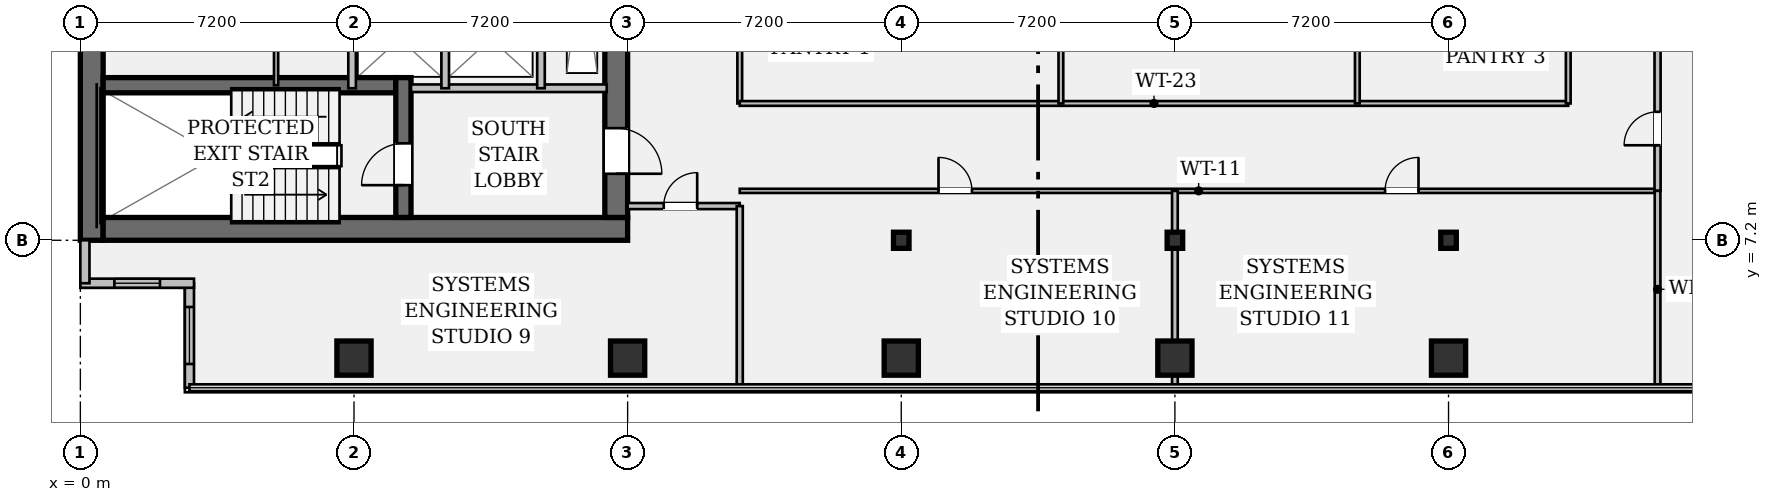
"""IFC4 building model, lengths in metres.
Left out: names, types, materials, properties, quantities, classifications, styles, units other than length and angle.
Written with IfcOpenShell. Run it as: python <this file> out.ifc"""

import sys

from ifc_helpers import new_model, si_unit, direction, frame, frame_2d, origin, origin_2d, place, context, subcontext, project, spatial, rectangle, hollow_rectangle, i_section, extrude, element, fill, save


model = new_model("IFC4")
c1 = context("Model", 3, precision=1e-05, world=origin(), true_north=direction((0.0, 1.0)))
c2 = subcontext(c1, "Body", "Model", "MODEL_VIEW")
j1 = project(units=[si_unit("LENGTHUNIT", "METRE"), si_unit("PLANEANGLEUNIT", "RADIAN")], contexts=[c1])
p1 = place(None, origin())
s1 = spatial("IfcSite", under=j1, at=p1, CompositionType="ELEMENT")
p2 = place(p1, origin())
s2 = spatial("IfcBuilding", under=s1, at=p2, CompositionType="ELEMENT")
p3 = place(p2, frame((0.0, 0.0, 121.45)))
s3 = spatial("IfcBuildingStorey", under=s2, at=p3, CompositionType="ELEMENT", Elevation=121.45)
p4 = place(p3, frame((0.3, 7.2, 0.0), z_axis=(0.0, 0.0, 1.0), x_axis=(0.0, 1.0, 0.0)))
e1 = element("IfcWall", 1, at=p4, inside=s3, PredefinedType="SHEAR", context=c2, shape_type="SweptSolid", body=[
    extrude(rectangle(XDim=28.8, YDim=0.6, at=frame_2d((14.4, 0.0))), origin(), (0.0, 0.0, 1.0), 3.58),
])
p5 = place(p3, frame((0.6, 7.5, 0.0), z_axis=(0.0, 0.0, 1.0), x_axis=(1.0, 0.0, 0.0)))
e2 = element("IfcWall", 2, at=p5, inside=s3, PredefinedType="SHEAR", context=c2, shape_type="SweptSolid", body=[
    extrude(rectangle(XDim=13.8, YDim=0.6, at=frame_2d((6.9, 0.0))), origin(), (0.0, 0.0, 1.0), 3.58),
])
p6 = place(p3, frame((14.1, 35.4, 0.0), z_axis=(0.0, 0.0, 1.0), x_axis=(0.0, -1.0, 0.0)))
e3 = element("IfcWall", 3, at=p6, inside=s3, PredefinedType="SHEAR", context=c2, shape_type="SweptSolid", body=[
    extrude(rectangle(XDim=27.6, YDim=0.6, at=frame_2d((13.8, 0.0))), origin(), (0.0, 0.0, 1.0), 3.58),
])
p7 = place(p6, frame((1.3, 0.0, 0.0)))
e4 = element("IfcOpeningElement", 4, at=p7, cuts=e3, PredefinedType="OPENING", context=c2, shape_type="SweptSolid", body=[
    extrude(rectangle(XDim=1.2, YDim=2.15, at=frame_2d((0.6, 1.075))), frame((0.0, 0.312, 0.0), z_axis=(0.0, -1.0, 0.0), x_axis=(1.0, 0.0, 0.0)), (0.0, 0.0, 1.0), 0.624),
])
p8 = place(p6, frame((25.25, 0.0, 0.0)))
e5 = element("IfcOpeningElement", 5, at=p8, cuts=e3, PredefinedType="OPENING", context=c2, shape_type="SweptSolid", body=[
    extrude(rectangle(XDim=1.2, YDim=2.15, at=frame_2d((0.6, 1.075))), frame((0.0, 0.312, 0.0), z_axis=(0.0, -1.0, 0.0), x_axis=(1.0, 0.0, 0.0)), (0.0, 0.0, 1.0), 0.624),
])
p9 = place(p6, frame((14.6, 0.0, 0.0)))
e6 = element("IfcOpeningElement", 6, at=p9, cuts=e3, PredefinedType="OPENING", context=c2, shape_type="SweptSolid", body=[
    extrude(rectangle(XDim=1.6, YDim=2.2, at=frame_2d((0.8, 1.1))), frame((0.0, 0.312, 0.0), z_axis=(0.0, -1.0, 0.0), x_axis=(1.0, 0.0, 0.0)), (0.0, 0.0, 1.0), 0.624),
])
p10 = place(p3, frame((0.6, 11.28, 0.0), z_axis=(0.0, 0.0, 1.0), x_axis=(1.0, 0.0, 0.0)))
e7 = element("IfcWall", 7, at=p10, inside=s3, PredefinedType="SHEAR", context=c2, shape_type="SweptSolid", body=[
    extrude(rectangle(XDim=7.7, YDim=0.4, at=frame_2d((3.85, 0.0))), origin(), (0.0, 0.0, 1.0), 3.58),
])
p11 = place(p3, frame((8.5, 7.8, 0.0), z_axis=(0.0, 0.0, 1.0), x_axis=(0.0, 1.0, 0.0)))
e8 = element("IfcWall", 8, at=p11, inside=s3, PredefinedType="SHEAR", context=c2, shape_type="SweptSolid", body=[
    extrude(rectangle(XDim=3.68, YDim=0.4, at=frame_2d((1.84, 0.0))), origin(), (0.0, 0.0, 1.0), 3.58),
])
p12 = place(p11, frame((0.85, 0.0, 0.0)))
e9 = element("IfcOpeningElement", 9, at=p12, cuts=e8, PredefinedType="OPENING", context=c2, shape_type="SweptSolid", body=[
    extrude(rectangle(XDim=1.1, YDim=2.15, at=frame_2d((0.55, 1.075))), frame((0.0, 0.212, 0.0), z_axis=(0.0, -1.0, 0.0), x_axis=(1.0, 0.0, 0.0)), (0.0, 0.0, 1.0), 0.424),
])
for number, where, z_axis, x_axis in (
    (10, (7.2, 4.1, 0.0), (0.0, 0.0, 1.0), (1.0, 0.0, 0.0)),
    (11, (14.4, 4.1, 0.0), (0.0, 0.0, 1.0), (1.0, 0.0, 0.0)),
    (12, (21.6, 4.1, 0.0), (0.0, 0.0, 1.0), (1.0, 0.0, 0.0)),
):
    element("IfcColumn", number, at=place(p3, frame(where, z_axis=z_axis, x_axis=x_axis)), inside=s3, PredefinedType="COLUMN", context=c2, shape_type="SweptSolid", body=[
        extrude(hollow_rectangle(XDim=0.9, YDim=0.9, WallThickness=0.055, at=origin_2d()), origin(), (0.0, 0.0, 1.0), 3.58),
    ])
p13 = place(p3, frame((21.6, 7.2, 0.0), z_axis=(0.0, 0.0, 1.0), x_axis=(1.0, 0.0, 0.0)))
e13 = element("IfcColumn", 13, at=p13, inside=s3, PredefinedType="COLUMN", context=c2, shape_type="SweptSolid", body=[
    extrude(i_section(OverallWidth=0.409, OverallDepth=0.424, WebThickness=0.033, FlangeThickness=0.052, FilletRadius=0.018, at=origin_2d()), origin(), (0.0, 0.0, 1.0), 3.58),
])
p14 = place(p3, frame((28.8, 4.1, 0.0), z_axis=(0.0, 0.0, 1.0), x_axis=(1.0, 0.0, 0.0)))
e14 = element("IfcColumn", 14, at=p14, inside=s3, PredefinedType="COLUMN", context=c2, shape_type="SweptSolid", body=[
    extrude(hollow_rectangle(XDim=0.9, YDim=0.9, WallThickness=0.055, at=origin_2d()), origin(), (0.0, 0.0, 1.0), 3.58),
])
p15 = place(p3, frame((28.8, 7.2, 0.0), z_axis=(0.0, 0.0, 1.0), x_axis=(1.0, 0.0, 0.0)))
e15 = element("IfcColumn", 15, at=p15, inside=s3, PredefinedType="COLUMN", context=c2, shape_type="SweptSolid", body=[
    extrude(i_section(OverallWidth=0.409, OverallDepth=0.424, WebThickness=0.033, FlangeThickness=0.052, FilletRadius=0.018, at=origin_2d()), origin(), (0.0, 0.0, 1.0), 3.58),
])
p16 = place(p3, frame((36.0, 4.1, 0.0), z_axis=(0.0, 0.0, 1.0), x_axis=(1.0, 0.0, 0.0)))
e16 = element("IfcColumn", 16, at=p16, inside=s3, PredefinedType="COLUMN", context=c2, shape_type="SweptSolid", body=[
    extrude(hollow_rectangle(XDim=0.9, YDim=0.9, WallThickness=0.055, at=origin_2d()), origin(), (0.0, 0.0, 1.0), 3.58),
])
p17 = place(p3, frame((36.0, 7.2, 0.0), z_axis=(0.0, 0.0, 1.0), x_axis=(1.0, 0.0, 0.0)))
e17 = element("IfcColumn", 17, at=p17, inside=s3, PredefinedType="COLUMN", context=c2, shape_type="SweptSolid", body=[
    extrude(i_section(OverallWidth=0.409, OverallDepth=0.424, WebThickness=0.033, FlangeThickness=0.052, FilletRadius=0.018, at=origin_2d()), origin(), (0.0, 0.0, 1.0), 3.58),
])
p18 = place(p3, frame((2.87, 3.32, 0.0), z_axis=(0.0, 0.0, 1.0), x_axis=(0.0, 1.0, 0.0)))
e18 = element("IfcWall", 18, at=p18, inside=s3, PredefinedType="STANDARD", context=c2, shape_type="SweptSolid", body=[
    extrude(rectangle(XDim=2.75, YDim=0.24, at=frame_2d((1.375, 0.0))), origin(), (0.0, 0.0, 1.0), 3.58),
])
p19 = place(p18, frame((0.625, 0.0, 0.95)))
e19 = element("IfcOpeningElement", 19, at=p19, cuts=e18, PredefinedType="OPENING", context=c2, shape_type="SweptSolid", body=[
    extrude(rectangle(XDim=1.5, YDim=1.8, at=frame_2d((0.75, 0.9))), frame((0.0, 0.132, 0.0), z_axis=(0.0, -1.0, 0.0), x_axis=(1.0, 0.0, 0.0)), (0.0, 0.0, 1.0), 0.264),
])
p20 = place(p3, frame((2.99, 6.07, 0.0), z_axis=(0.0, 0.0, 1.0), x_axis=(-1.0, 0.0, 0.0)))
e20 = element("IfcWall", 20, at=p20, inside=s3, PredefinedType="STANDARD", context=c2, shape_type="SweptSolid", body=[
    extrude(rectangle(XDim=2.99, YDim=0.24, at=frame_2d((1.495, 0.0))), origin(), (0.0, 0.0, 1.0), 3.58),
])
p21 = place(p20, frame((0.895, 0.0, 0.95)))
e21 = element("IfcOpeningElement", 21, at=p21, cuts=e20, PredefinedType="OPENING", context=c2, shape_type="SweptSolid", body=[
    extrude(rectangle(XDim=1.2, YDim=1.8, at=frame_2d((0.6, 0.9))), frame((0.0, 0.132, 0.0), z_axis=(0.0, -1.0, 0.0), x_axis=(1.0, 0.0, 0.0)), (0.0, 0.0, 1.0), 0.264),
])
p22 = place(p3, frame((0.12, 6.07, 0.0), z_axis=(0.0, 0.0, 1.0), x_axis=(0.0, 1.0, 0.0)))
e22 = element("IfcWall", 22, at=p22, inside=s3, PredefinedType="STANDARD", context=c2, shape_type="SweptSolid", body=[
    extrude(rectangle(XDim=1.13, YDim=0.24, at=frame_2d((0.565, 0.0))), origin(), (0.0, 0.0, 1.0), 3.58),
])
p23 = place(p3, frame((8.7, 11.2, 0.0), z_axis=(0.0, 0.0, 1.0), x_axis=(1.0, 0.0, 0.0)))
e23 = element("IfcWall", 23, at=p23, inside=s3, PredefinedType="PARTITIONING", context=c2, shape_type="SweptSolid", body=[
    extrude(rectangle(XDim=5.15, YDim=0.2, at=frame_2d((2.575, 0.0))), origin(), (0.0, 0.0, 1.0), 3.58),
])
for number, where, z_axis, x_axis in (
    (24, (7.15, 11.2, 0.0), (0.0, 0.0, 1.0), (0.0, 1.0, 0.0)),
    (25, (9.6, 11.2, 0.0), (0.0, 0.0, 1.0), (0.0, 1.0, 0.0)),
):
    element("IfcWall", number, at=place(p3, frame(where, z_axis=z_axis, x_axis=x_axis)), inside=s3, PredefinedType="PARTITIONING", context=c2, shape_type="SweptSolid", body=[
        extrude(rectangle(XDim=2.4, YDim=0.2, at=frame_2d((1.2, 0.0))), origin(), (0.0, 0.0, 1.0), 3.58),
    ])
p24 = place(p3, frame((12.12, 11.2, 0.0), z_axis=(0.0, 0.0, 1.0), x_axis=(0.0, 1.0, 0.0)))
e26 = element("IfcWall", 26, at=p24, inside=s3, PredefinedType="PARTITIONING", context=c2, shape_type="SweptSolid", body=[
    extrude(rectangle(XDim=6.6, YDim=0.2, at=frame_2d((3.3, 0.0))), origin(), (0.0, 0.0, 1.0), 3.58),
])
p25 = place(p24, frame((2.95, 0.0, 0.0)))
e27 = element("IfcOpeningElement", 27, at=p25, cuts=e26, PredefinedType="OPENING", context=c2, shape_type="SweptSolid", body=[
    extrude(rectangle(XDim=0.85, YDim=2.15, at=frame_2d((0.425, 1.075))), frame((0.0, 0.112, 0.0), z_axis=(0.0, -1.0, 0.0), x_axis=(1.0, 0.0, 0.0)), (0.0, 0.0, 1.0), 0.224),
])
p26 = place(p3, frame((5.15, 11.28, 0.0), z_axis=(0.0, 0.0, 1.0), x_axis=(0.0, 1.0, 0.0)))
e28 = element("IfcWall", 28, at=p26, inside=s3, PredefinedType="PARTITIONING", context=c2, shape_type="SweptSolid", body=[
    extrude(rectangle(XDim=4.42, YDim=0.11, at=frame_2d((2.21, 0.0))), origin(), (0.0, 0.0, 1.0), 3.58),
])
p27 = place(p3, frame((14.4, 8.1, 0.0), z_axis=(0.0, 0.0, 1.0), x_axis=(1.0, 0.0, 0.0)))
e29 = element("IfcWall", 29, at=p27, inside=s3, PredefinedType="PARTITIONING", context=c2, shape_type="SweptSolid", body=[
    extrude(rectangle(XDim=2.95, YDim=0.16, at=frame_2d((1.475, 0.0))), origin(), (0.0, 0.0, 1.0), 3.098),
])
p28 = place(p27, frame((0.95, 0.0, 0.0)))
e30 = element("IfcOpeningElement", 30, at=p28, cuts=e29, PredefinedType="OPENING", context=c2, shape_type="SweptSolid", body=[
    extrude(rectangle(XDim=0.88, YDim=2.15, at=frame_2d((0.44, 1.075))), frame((0.0, 0.092, 0.0), z_axis=(0.0, -1.0, 0.0), x_axis=(1.0, 0.0, 0.0)), (0.0, 0.0, 1.0), 0.184),
])
p29 = place(p3, frame((17.35, 8.5, 0.0), z_axis=(0.0, 0.0, 1.0), x_axis=(1.0, 0.0, 0.0)))
e31 = element("IfcWall", 31, at=p29, inside=s3, PredefinedType="PARTITIONING", context=c2, shape_type="SweptSolid", body=[
    extrude(rectangle(XDim=24.15, YDim=0.11, at=frame_2d((12.075, 0.0))), origin(), (0.0, 0.0, 1.0), 2.869),
])
p30 = place(p29, frame((5.23, 0.0, 0.0)))
e32 = element("IfcOpeningElement", 32, at=p30, cuts=e31, PredefinedType="OPENING", context=c2, shape_type="SweptSolid", body=[
    extrude(rectangle(XDim=0.88, YDim=2.15, at=frame_2d((0.44, 1.075))), frame((0.0, 0.067, 0.0), z_axis=(0.0, -1.0, 0.0), x_axis=(1.0, 0.0, 0.0)), (0.0, 0.0, 1.0), 0.134),
])
p31 = place(p29, frame((16.98, 0.0, 0.0)))
e33 = element("IfcOpeningElement", 33, at=p31, cuts=e31, PredefinedType="OPENING", context=c2, shape_type="SweptSolid", body=[
    extrude(rectangle(XDim=0.88, YDim=2.15, at=frame_2d((0.44, 1.075))), frame((0.0, 0.067, 0.0), z_axis=(0.0, -1.0, 0.0), x_axis=(1.0, 0.0, 0.0)), (0.0, 0.0, 1.0), 0.134),
])
p32 = place(p3, frame((41.5, 8.5, 0.0), z_axis=(0.0, 0.0, 1.0), x_axis=(0.0, 1.0, 0.0)))
e34 = element("IfcWall", 34, at=p32, inside=s3, PredefinedType="PARTITIONING", context=c2, shape_type="SweptSolid", body=[
    extrude(rectangle(XDim=12.2, YDim=0.16, at=frame_2d((6.1, 0.0))), origin(), (0.0, 0.0, 1.0), 2.869),
])
p33 = place(p32, frame((1.2, 0.0, 0.0)))
e35 = element("IfcOpeningElement", 35, at=p33, cuts=e34, PredefinedType="OPENING", context=c2, shape_type="SweptSolid", body=[
    extrude(rectangle(XDim=0.88, YDim=2.15, at=frame_2d((0.44, 1.075))), frame((0.0, 0.092, 0.0), z_axis=(0.0, -1.0, 0.0), x_axis=(1.0, 0.0, 0.0)), (0.0, 0.0, 1.0), 0.184),
])
p34 = place(p32, frame((10.2, 0.0, 0.0)))
e36 = element("IfcOpeningElement", 36, at=p34, cuts=e34, PredefinedType="OPENING", context=c2, shape_type="SweptSolid", body=[
    extrude(rectangle(XDim=0.88, YDim=2.15, at=frame_2d((0.44, 1.075))), frame((0.0, 0.092, 0.0), z_axis=(0.0, -1.0, 0.0), x_axis=(1.0, 0.0, 0.0)), (0.0, 0.0, 1.0), 0.184),
])
p35 = place(p3, frame((17.35, 10.8, 0.0), z_axis=(0.0, 0.0, 1.0), x_axis=(0.0, 1.0, 0.0)))
e37 = element("IfcWall", 37, at=p35, inside=s3, PredefinedType="PARTITIONING", context=c2, shape_type="SweptSolid", body=[
    extrude(rectangle(XDim=7.55, YDim=0.125, at=frame_2d((3.775, 0.0))), origin(), (0.0, 0.0, 1.0), 2.869),
])
p36 = place(p3, frame((17.35, 10.8, 0.0), z_axis=(0.0, 0.0, 1.0), x_axis=(1.0, 0.0, 0.0)))
e38 = element("IfcWall", 38, at=p36, inside=s3, PredefinedType="PARTITIONING", context=c2, shape_type="SweptSolid", body=[
    extrude(rectangle(XDim=21.8, YDim=0.125, at=frame_2d((10.9, 0.0))), origin(), (0.0, 0.0, 1.0), 2.869),
])
for number, where, z_axis, x_axis in (
    (39, (39.15, 10.8, 0.0), (0.0, 0.0, 1.0), (0.0, 1.0, 0.0)),
    (40, (25.8, 10.8, 0.0), (0.0, 0.0, 1.0), (0.0, 1.0, 0.0)),
    (41, (33.6, 10.8, 0.0), (0.0, 0.0, 1.0), (0.0, 1.0, 0.0)),
):
    element("IfcWall", number, at=place(p3, frame(where, z_axis=z_axis, x_axis=x_axis)), inside=s3, PredefinedType="PARTITIONING", context=c2, shape_type="SweptSolid", body=[
        extrude(rectangle(XDim=7.55, YDim=0.125, at=frame_2d((3.775, 0.0))), origin(), (0.0, 0.0, 1.0), 2.869),
    ])
p37 = place(p3, frame((41.5, 3.32, 0.0), z_axis=(0.0, 0.0, 1.0), x_axis=(0.0, 1.0, 0.0)))
e42 = element("IfcWall", 42, at=p37, inside=s3, PredefinedType="PARTITIONING", context=c2, shape_type="SweptSolid", body=[
    extrude(rectangle(XDim=5.18, YDim=0.15, at=frame_2d((2.59, 0.0))), origin(), (0.0, 0.0, 1.0), 2.869),
])
p38 = place(p3, frame((17.35, 3.32, 0.0), z_axis=(0.0, 0.0, 1.0), x_axis=(0.0, 1.0, 0.0)))
e43 = element("IfcWall", 43, at=p38, inside=s3, PredefinedType="PARTITIONING", context=c2, shape_type="SweptSolid", body=[
    extrude(rectangle(XDim=4.78, YDim=0.16, at=frame_2d((2.39, 0.0))), origin(), (0.0, 0.0, 1.0), 2.869),
])
p39 = place(p3, frame((28.8, 3.32, 0.0), z_axis=(0.0, 0.0, 1.0), x_axis=(0.0, 1.0, 0.0)))
e44 = element("IfcWall", 44, at=p39, inside=s3, PredefinedType="PARTITIONING", context=c2, shape_type="SweptSolid", body=[
    extrude(rectangle(XDim=5.18, YDim=0.15, at=frame_2d((2.59, 0.0))), origin(), (0.0, 0.0, 1.0), 2.869),
])
p40 = place(p19, origin())
e45 = element("IfcWindow", 45, at=p40, inside=s3, PartitioningType="SINGLE_PANEL", PredefinedType="WINDOW", context=c2, shape_type="SweptSolid", body=[
    extrude(rectangle(XDim=1.5, YDim=1.8, at=frame_2d((0.75, 0.9))), frame((0.0, 0.03, 0.0), z_axis=(0.0, -1.0, 0.0), x_axis=(1.0, 0.0, 0.0)), (0.0, 0.0, 1.0), 0.06),
])
fill(e19, e45)
p41 = place(p21, origin())
e46 = element("IfcWindow", 46, at=p41, inside=s3, PartitioningType="SINGLE_PANEL", PredefinedType="WINDOW", context=c2, shape_type="SweptSolid", body=[
    extrude(rectangle(XDim=1.2, YDim=1.8, at=frame_2d((0.6, 0.9))), frame((0.0, 0.03, 0.0), z_axis=(0.0, -1.0, 0.0), x_axis=(1.0, 0.0, 0.0)), (0.0, 0.0, 1.0), 0.06),
])
fill(e21, e46)
p42 = place(p12, origin())
e47 = element("IfcDoor", 47, at=p42, inside=s3, OperationType="SINGLE_SWING_LEFT", PredefinedType="DOOR", context=c2, shape_type="SweptSolid", body=[
    extrude(rectangle(XDim=1.1, YDim=2.15, at=frame_2d((0.55, 1.075))), frame((0.0, 0.025, 0.0), z_axis=(0.0, -1.0, 0.0), x_axis=(1.0, 0.0, 0.0)), (0.0, 0.0, 1.0), 0.05),
])
fill(e9, e47)
p43 = place(p8, origin())
e48 = element("IfcDoor", 48, at=p43, inside=s3, OperationType="SINGLE_SWING_RIGHT", PredefinedType="DOOR", context=c2, shape_type="SweptSolid", body=[
    extrude(rectangle(XDim=1.2, YDim=2.15, at=frame_2d((0.6, 1.075))), frame((0.0, 0.025, 0.0), z_axis=(0.0, -1.0, 0.0), x_axis=(1.0, 0.0, 0.0)), (0.0, 0.0, 1.0), 0.05),
])
fill(e5, e48)
p44 = place(p33, origin())
e49 = element("IfcDoor", 49, at=p44, inside=s3, OperationType="SINGLE_SWING_LEFT", PredefinedType="DOOR", context=c2, shape_type="SweptSolid", body=[
    extrude(rectangle(XDim=0.88, YDim=2.15, at=frame_2d((0.44, 1.075))), frame((0.0, 0.025, 0.0), z_axis=(0.0, -1.0, 0.0), x_axis=(1.0, 0.0, 0.0)), (0.0, 0.0, 1.0), 0.05),
])
fill(e35, e49)
p45 = place(p28, origin())
e50 = element("IfcDoor", 50, at=p45, inside=s3, OperationType="SINGLE_SWING_RIGHT", PredefinedType="DOOR", context=c2, shape_type="SweptSolid", body=[
    extrude(rectangle(XDim=0.88, YDim=2.15, at=frame_2d((0.44, 1.075))), frame((0.0, 0.025, 0.0), z_axis=(0.0, -1.0, 0.0), x_axis=(1.0, 0.0, 0.0)), (0.0, 0.0, 1.0), 0.05),
])
fill(e30, e50)
p46 = place(p30, origin())
e51 = element("IfcDoor", 51, at=p46, inside=s3, OperationType="SINGLE_SWING_LEFT", PredefinedType="DOOR", context=c2, shape_type="SweptSolid", body=[
    extrude(rectangle(XDim=0.88, YDim=2.15, at=frame_2d((0.44, 1.075))), frame((0.0, 0.025, 0.0), z_axis=(0.0, -1.0, 0.0), x_axis=(1.0, 0.0, 0.0)), (0.0, 0.0, 1.0), 0.05),
])
fill(e32, e51)
p47 = place(p31, origin())
e52 = element("IfcDoor", 52, at=p47, inside=s3, OperationType="SINGLE_SWING_RIGHT", PredefinedType="DOOR", context=c2, shape_type="SweptSolid", body=[
    extrude(rectangle(XDim=0.88, YDim=2.15, at=frame_2d((0.44, 1.075))), frame((0.0, 0.025, 0.0), z_axis=(0.0, -1.0, 0.0), x_axis=(1.0, 0.0, 0.0)), (0.0, 0.0, 1.0), 0.05),
])
fill(e33, e52)
save(model, sys.argv[1])
